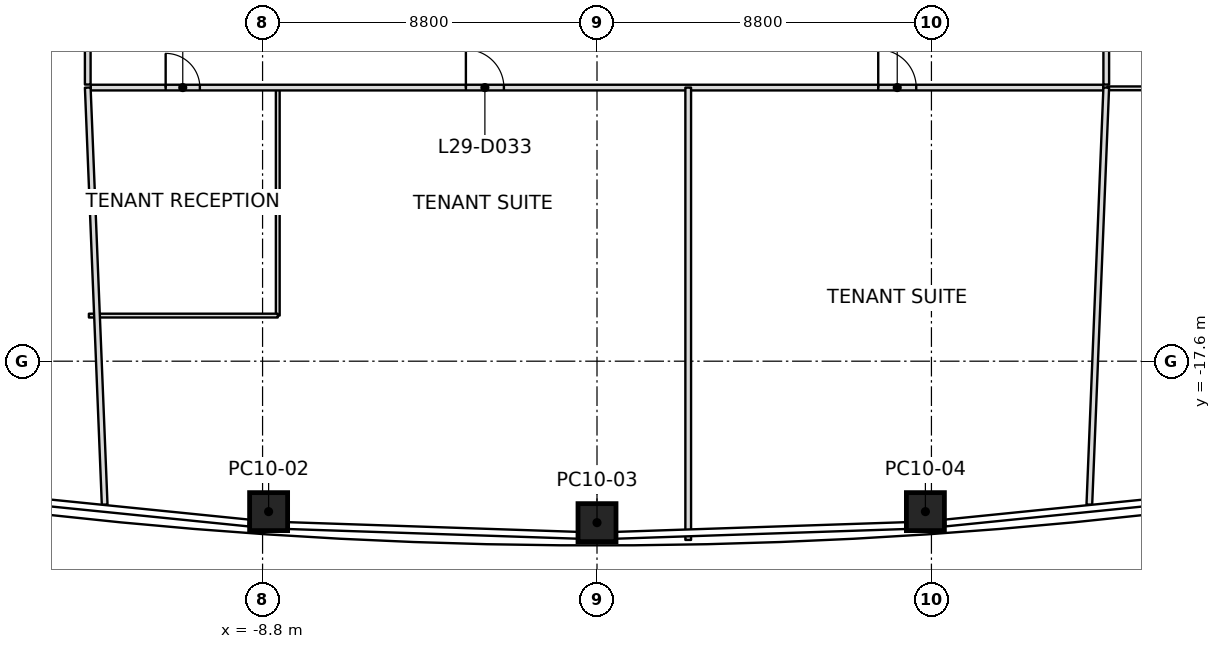
"""IFC4 building model, lengths in metres.
Left out: names, types, materials, properties, quantities, classifications, styles, units other than length and angle.
Written with IfcOpenShell. Run it as: python <this file> out.ifc"""

import sys

from ifc_helpers import new_model, si_unit, direction, frame, frame_2d, origin, origin_2d, place, context, subcontext, project, spatial, rectangle, extrude, element, fill, save


model = new_model("IFC4")
c1 = context("Model", 3, precision=1e-05, world=origin(), true_north=direction((0.0, 1.0)))
c2 = subcontext(c1, "Body", "Model", "MODEL_VIEW")
j1 = project(units=[si_unit("LENGTHUNIT", "METRE"), si_unit("PLANEANGLEUNIT", "RADIAN")], contexts=[c1])
p1 = place(None, origin())
s1 = spatial("IfcSite", under=j1, at=p1, CompositionType="ELEMENT")
p2 = place(p1, origin())
s2 = spatial("IfcBuilding", under=s1, at=p2, CompositionType="ELEMENT")
p3 = place(p2, frame((0.0, 0.0, 137.8)))
s3 = spatial("IfcBuildingStorey", under=s2, at=p3, CompositionType="ELEMENT", Elevation=137.8)
p4 = place(p3, frame((-8.641, -21.559, 0.0), z_axis=(0.008849199152, 0.01116829962, 0.999898475225), x_axis=(-0.997716007081, 0.067063175126, 0.008080826415)))
e1 = element("IfcColumn", 1, at=p4, inside=s3, PredefinedType="COLUMN", context=c2, shape_type="SweptSolid", body=[
    extrude(rectangle(XDim=1.0, YDim=1.0, at=origin_2d()), origin(), (0.0, 0.0, 1.0), 4.0),
])
p5 = place(p3, frame((0.0, -21.849, 0.0), z_axis=(0.0, 0.01141283087, 0.999934871525), x_axis=(1.0, 0.0, 0.0)))
e2 = element("IfcColumn", 2, at=p5, inside=s3, PredefinedType="COLUMN", context=c2, shape_type="SweptSolid", body=[
    extrude(rectangle(XDim=1.0, YDim=1.0, at=origin_2d()), origin(), (0.0, 0.0, 1.0), 4.0),
])
p6 = place(p3, frame((8.641, -21.559, 0.0), z_axis=(-0.008849199152, 0.01116829962, 0.999898475225), x_axis=(0.997716007081, 0.067063175126, 0.008080826415)))
e3 = element("IfcColumn", 3, at=p6, inside=s3, PredefinedType="COLUMN", context=c2, shape_type="SweptSolid", body=[
    extrude(rectangle(XDim=1.0, YDim=1.0, at=origin_2d()), origin(), (0.0, 0.0, 1.0), 4.0),
])
p7 = place(p3, frame((-13.4, -10.4, 0.0), z_axis=(0.0, 0.0, 1.0), x_axis=(0.040518361505, -0.999178794001, 0.0)))
e4 = element("IfcWall", 4, at=p7, inside=s3, PredefinedType="PARTITIONING", context=c2, shape_type="SweptSolid", body=[
    extrude(rectangle(XDim=10.984, YDim=0.15, at=frame_2d((5.492, 0.0))), origin(), (0.0, 0.0, 1.0), 3.234),
])
p8 = place(p3, frame((2.4, -10.4, 0.0), z_axis=(0.0, 0.0, 1.0), x_axis=(0.0, -1.0, 0.0)))
e5 = element("IfcWall", 5, at=p8, inside=s3, PredefinedType="PARTITIONING", context=c2, shape_type="SweptSolid", body=[
    extrude(rectangle(XDim=11.904, YDim=0.15, at=frame_2d((5.952, 0.0))), origin(), (0.0, 0.0, 1.0), 3.234),
])
p9 = place(p3, frame((13.4, -10.4, 0.0), z_axis=(0.0, 0.0, 1.0), x_axis=(-0.040518361505, -0.999178794001, 0.0)))
e6 = element("IfcWall", 6, at=p9, inside=s3, PredefinedType="PARTITIONING", context=c2, shape_type="SweptSolid", body=[
    extrude(rectangle(XDim=10.984, YDim=0.15, at=frame_2d((5.492, 0.0))), origin(), (0.0, 0.0, 1.0), 3.234),
])
p10 = place(p3, frame((-13.4, 10.32, 0.0), z_axis=(0.0, 0.0, 1.0), x_axis=(0.0, -1.0, 0.0)))
e7 = element("IfcWall", 7, at=p10, inside=s3, PredefinedType="PARTITIONING", context=c2, shape_type="SweptSolid", body=[
    extrude(rectangle(XDim=20.64, YDim=0.15, at=frame_2d((10.32, 0.0))), origin(), (0.0, 0.0, 1.0), 3.166),
])
p11 = place(p10, frame((4.32, 0.0, 0.0)))
e8 = element("IfcOpeningElement", 8, at=p11, cuts=e7, PredefinedType="OPENING", context=c2, shape_type="SweptSolid", body=[
    extrude(rectangle(XDim=1.0, YDim=2.1, at=frame_2d((0.5, 1.05))), frame((0.0, 0.075, 0.0), z_axis=(0.0, -1.0, 0.0), x_axis=(1.0, 0.0, 0.0)), (0.0, 0.0, 1.0), 0.15),
])
p12 = place(p10, frame((10.77, 0.0, 0.0)))
e9 = element("IfcOpeningElement", 9, at=p12, cuts=e7, PredefinedType="OPENING", context=c2, shape_type="SweptSolid", body=[
    extrude(rectangle(XDim=0.9, YDim=2.1, at=frame_2d((0.45, 1.05))), frame((0.0, 0.075, 0.0), z_axis=(0.0, -1.0, 0.0), x_axis=(1.0, 0.0, 0.0)), (0.0, 0.0, 1.0), 0.15),
])
p13 = place(p10, frame((16.28, 0.0, 0.0)))
e10 = element("IfcOpeningElement", 10, at=p13, cuts=e7, PredefinedType="OPENING", context=c2, shape_type="SweptSolid", body=[
    extrude(rectangle(XDim=1.0, YDim=2.1, at=frame_2d((0.5, 1.05))), frame((0.0, 0.075, 0.0), z_axis=(0.0, -1.0, 0.0), x_axis=(1.0, 0.0, 0.0)), (0.0, 0.0, 1.0), 0.15),
])
p14 = place(p3, frame((-13.32, -10.4, 0.0), z_axis=(0.0, 0.0, 1.0), x_axis=(1.0, 0.0, 0.0)))
e11 = element("IfcWall", 11, at=p14, inside=s3, PredefinedType="PARTITIONING", context=c2, shape_type="SweptSolid", body=[
    extrude(rectangle(XDim=26.64, YDim=0.15, at=frame_2d((13.32, 0.0))), origin(), (0.0, 0.0, 1.0), 3.3),
])
p15 = place(p14, frame((1.97, 0.0, 0.0)))
e12 = element("IfcOpeningElement", 12, at=p15, cuts=e11, PredefinedType="OPENING", context=c2, shape_type="SweptSolid", body=[
    extrude(rectangle(XDim=0.9, YDim=2.1, at=frame_2d((0.45, 1.05))), frame((0.0, 0.075, 0.0), z_axis=(0.0, -1.0, 0.0), x_axis=(1.0, 0.0, 0.0)), (0.0, 0.0, 1.0), 0.15),
])
p16 = place(p14, frame((9.87, 0.0, 0.0)))
e13 = element("IfcOpeningElement", 13, at=p16, cuts=e11, PredefinedType="OPENING", context=c2, shape_type="SweptSolid", body=[
    extrude(rectangle(XDim=1.0, YDim=2.1, at=frame_2d((0.5, 1.05))), frame((0.0, 0.075, 0.0), z_axis=(0.0, -1.0, 0.0), x_axis=(1.0, 0.0, 0.0)), (0.0, 0.0, 1.0), 0.15),
])
p17 = place(p14, frame((20.72, 0.0, 0.0)))
e14 = element("IfcOpeningElement", 14, at=p17, cuts=e11, PredefinedType="OPENING", context=c2, shape_type="SweptSolid", body=[
    extrude(rectangle(XDim=1.0, YDim=2.1, at=frame_2d((0.5, 1.05))), frame((0.0, 0.075, 0.0), z_axis=(0.0, -1.0, 0.0), x_axis=(1.0, 0.0, 0.0)), (0.0, 0.0, 1.0), 0.15),
])
p18 = place(p3, frame((13.4, -10.32, 0.0), z_axis=(0.0, 0.0, 1.0), x_axis=(0.0, 1.0, 0.0)))
e15 = element("IfcWall", 15, at=p18, inside=s3, PredefinedType="PARTITIONING", context=c2, shape_type="SweptSolid", body=[
    extrude(rectangle(XDim=20.64, YDim=0.15, at=frame_2d((10.32, 0.0))), origin(), (0.0, 0.0, 1.0), 3.097),
])
p19 = place(p18, frame((14.72, 0.0, 0.0)))
e16 = element("IfcOpeningElement", 16, at=p19, cuts=e15, PredefinedType="OPENING", context=c2, shape_type="SweptSolid", body=[
    extrude(rectangle(XDim=1.0, YDim=2.1, at=frame_2d((0.5, 1.05))), frame((0.0, 0.075, 0.0), z_axis=(0.0, -1.0, 0.0), x_axis=(1.0, 0.0, 0.0)), (0.0, 0.0, 1.0), 0.15),
])
p20 = place(p18, frame((1.25, 0.0, 0.0)))
e17 = element("IfcOpeningElement", 17, at=p20, cuts=e15, PredefinedType="OPENING", context=c2, shape_type="SweptSolid", body=[
    extrude(rectangle(XDim=0.9, YDim=2.1, at=frame_2d((0.45, 1.05))), frame((0.0, 0.075, 0.0), z_axis=(0.0, -1.0, 0.0), x_axis=(1.0, 0.0, 0.0)), (0.0, 0.0, 1.0), 0.15),
])
p21 = place(p18, frame((6.16, 0.0, 0.0)))
e18 = element("IfcOpeningElement", 18, at=p21, cuts=e15, PredefinedType="OPENING", context=c2, shape_type="SweptSolid", body=[
    extrude(rectangle(XDim=1.0, YDim=2.1, at=frame_2d((0.5, 1.05))), frame((0.0, 0.075, 0.0), z_axis=(0.0, -1.0, 0.0), x_axis=(1.0, 0.0, 0.0)), (0.0, 0.0, 1.0), 0.15),
])
p22 = place(p3, frame((-8.4, -10.43, 0.0), z_axis=(0.0, 0.0, 1.0), x_axis=(0.0, -1.0, 0.0)))
e19 = element("IfcWall", 19, at=p22, inside=s3, PredefinedType="PARTITIONING", context=c2, shape_type="SweptSolid", body=[
    extrude(rectangle(XDim=5.97, YDim=0.1, at=frame_2d((2.985, 0.0))), origin(), (0.0, 0.0, 1.0), 3.3),
])
p23 = place(p3, frame((-8.4, -16.4, 0.0), z_axis=(0.0, 0.0, 1.0), x_axis=(-1.0, 0.0, 0.0)))
e20 = element("IfcWall", 20, at=p23, inside=s3, PredefinedType="PARTITIONING", context=c2, shape_type="SweptSolid", body=[
    extrude(rectangle(XDim=4.97, YDim=0.1, at=frame_2d((2.485, 0.0))), origin(), (0.0, 0.0, 1.0), 3.3),
])
p24 = place(p3, frame((17.6, -10.42, 0.0), z_axis=(0.0, 0.0, 1.0), x_axis=(-1.0, 0.0, 0.0)))
e21 = element("IfcWall", 21, at=p24, inside=s3, PredefinedType="PARTITIONING", context=c2, shape_type="SweptSolid", body=[
    extrude(rectangle(XDim=4.17, YDim=0.1, at=frame_2d((2.085, 0.0))), origin(), (0.0, 0.0, 1.0), 3.166),
])
p25 = place(p15, origin())
e22 = element("IfcDoor", 22, at=p25, inside=s3, OperationType="SINGLE_SWING_RIGHT", PredefinedType="DOOR", context=c2, shape_type="SweptSolid", body=[
    extrude(rectangle(XDim=0.9, YDim=2.1, at=frame_2d((0.45, 1.05))), frame((0.0, 0.025, 0.0), z_axis=(0.0, -1.0, 0.0), x_axis=(1.0, 0.0, 0.0)), (0.0, 0.0, 1.0), 0.05),
])
fill(e12, e22)
p26 = place(p16, origin())
e23 = element("IfcDoor", 23, at=p26, inside=s3, OperationType="SINGLE_SWING_RIGHT", PredefinedType="DOOR", context=c2, shape_type="SweptSolid", body=[
    extrude(rectangle(XDim=1.0, YDim=2.1, at=frame_2d((0.5, 1.05))), frame((0.0, 0.025, 0.0), z_axis=(0.0, -1.0, 0.0), x_axis=(1.0, 0.0, 0.0)), (0.0, 0.0, 1.0), 0.05),
])
fill(e13, e23)
p27 = place(p17, origin())
e24 = element("IfcDoor", 24, at=p27, inside=s3, OperationType="SINGLE_SWING_RIGHT", PredefinedType="DOOR", context=c2, shape_type="SweptSolid", body=[
    extrude(rectangle(XDim=1.0, YDim=2.1, at=frame_2d((0.5, 1.05))), frame((0.0, 0.025, 0.0), z_axis=(0.0, -1.0, 0.0), x_axis=(1.0, 0.0, 0.0)), (0.0, 0.0, 1.0), 0.05),
])
fill(e14, e24)
save(model, sys.argv[1])
